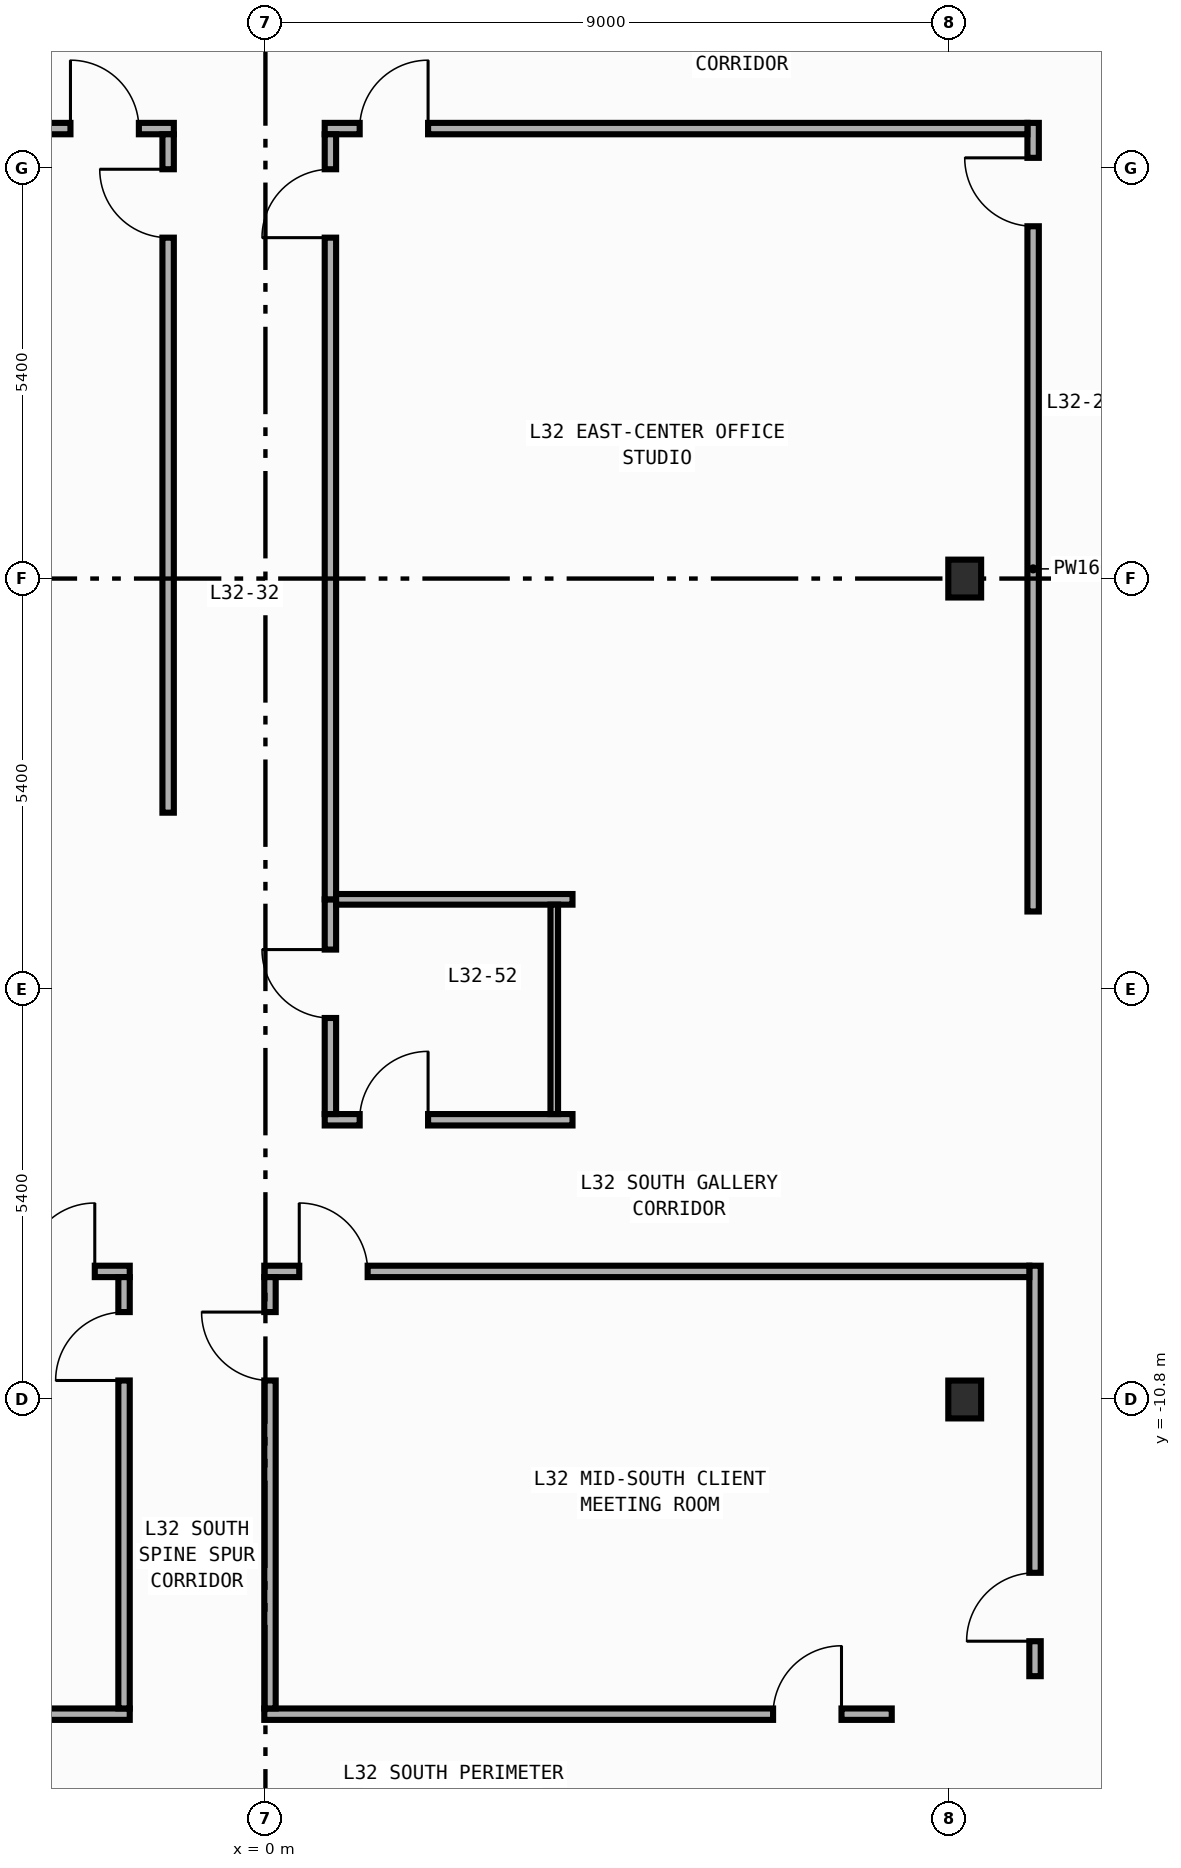
"""IFC4 building model, lengths in metres.
Left out: names, types, materials, properties, quantities, classifications, styles, units other than length and angle.
Written with IfcOpenShell. Run it as: python <this file> out.ifc"""

import sys

from ifc_helpers import new_model, si_unit, direction, frame, frame_2d, origin, origin_2d, place, context, subcontext, project, spatial, rectangle, i_section, extrude, element, fill, save


model = new_model("IFC4")
c1 = context("Model", 3, precision=1e-05, world=origin(), true_north=direction((0.0, 1.0)))
c2 = subcontext(c1, "Body", "Model", "MODEL_VIEW")
j1 = project(units=[si_unit("LENGTHUNIT", "METRE"), si_unit("PLANEANGLEUNIT", "RADIAN")], contexts=[c1])
p1 = place(None, origin())
s1 = spatial("IfcSite", under=j1, at=p1, CompositionType="ELEMENT")
p2 = place(p1, origin())
s2 = spatial("IfcBuilding", under=s1, at=p2, CompositionType="ELEMENT")
p3 = place(p2, frame((0.0, 0.0, 139.4)))
s3 = spatial("IfcBuildingStorey", under=s2, at=p3, CompositionType="ELEMENT", Elevation=139.4)
for number, where, z_axis, x_axis in (
    (1, (9.2, -10.8, 0.0), (0.0, 0.0, 1.0), (1.0, 0.0, 0.0)),
    (2, (9.2, 0.0, 0.0), (0.0, 0.0, 1.0), (1.0, 0.0, 0.0)),
):
    element("IfcColumn", number, at=place(p3, frame(where, z_axis=z_axis, x_axis=x_axis)), inside=s3, PredefinedType="COLUMN", context=c2, shape_type="SweptSolid", body=[
        extrude(i_section(OverallWidth=0.432, OverallDepth=0.498, WebThickness=0.045, FlangeThickness=0.07, FilletRadius=0.022, at=origin_2d()), origin(), (0.0, 0.0, 1.0), 4.2),
    ])
p4 = place(p3, frame((10.1, -4.38, 0.0), z_axis=(0.0, 0.0, 1.0), x_axis=(0.0, 1.0, 0.0)))
e3 = element("IfcWall", 3, at=p4, inside=s3, PredefinedType="PARTITIONING", context=c2, shape_type="SweptSolid", body=[
    extrude(rectangle(XDim=10.375, YDim=0.15, at=frame_2d((5.188, 0.0))), origin(), (0.0, 0.0, 1.0), 3.94),
])
p5 = place(p4, frame((9.015, 0.0, 0.0)))
e4 = element("IfcOpeningElement", 4, at=p5, cuts=e3, PredefinedType="OPENING", context=c2, shape_type="SweptSolid", body=[
    extrude(rectangle(XDim=0.9, YDim=2.15, at=frame_2d((0.45, 1.075))), frame((0.0, 0.085, 0.0), z_axis=(0.0, -1.0, 0.0), x_axis=(1.0, 0.0, 0.0)), (0.0, 0.0, 1.0), 0.17),
])
p6 = place(p3, frame((10.125, -14.44, 0.0), z_axis=(0.0, 0.0, 1.0), x_axis=(0.0, 1.0, 0.0)))
e5 = element("IfcWall", 5, at=p6, inside=s3, PredefinedType="PARTITIONING", context=c2, shape_type="SweptSolid", body=[
    extrude(rectangle(XDim=5.4, YDim=0.15, at=frame_2d((2.7, 0.0))), origin(), (0.0, 0.0, 1.0), 3.94),
])
p7 = place(p6, frame((0.46, 0.0, 0.0)))
e6 = element("IfcOpeningElement", 6, at=p7, cuts=e5, PredefinedType="OPENING", context=c2, shape_type="SweptSolid", body=[
    extrude(rectangle(XDim=0.9, YDim=2.15, at=frame_2d((0.45, 1.075))), frame((0.0, 0.085, 0.0), z_axis=(0.0, -1.0, 0.0), x_axis=(1.0, 0.0, 0.0)), (0.0, 0.0, 1.0), 0.17),
])
p8 = place(p3, frame((0.78, 5.92, 0.0), z_axis=(0.0, 0.0, 1.0), x_axis=(1.0, 0.0, 0.0)))
e7 = element("IfcWall", 7, at=p8, inside=s3, PredefinedType="PARTITIONING", context=c2, shape_type="SweptSolid", body=[
    extrude(rectangle(XDim=9.245, YDim=0.15, at=frame_2d((4.623, 0.0))), origin(), (0.0, 0.0, 1.0), 3.94),
])
p9 = place(p8, frame((0.46, 0.0, 0.0)))
e8 = element("IfcOpeningElement", 8, at=p9, cuts=e7, PredefinedType="OPENING", context=c2, shape_type="SweptSolid", body=[
    extrude(rectangle(XDim=0.9, YDim=2.15, at=frame_2d((0.45, 1.075))), frame((0.0, 0.085, 0.0), z_axis=(0.0, -1.0, 0.0), x_axis=(1.0, 0.0, 0.0)), (0.0, 0.0, 1.0), 0.17),
])
p10 = place(p3, frame((-10.025, 5.92, 0.0), z_axis=(0.0, 0.0, 1.0), x_axis=(1.0, 0.0, 0.0)))
e9 = element("IfcWall", 9, at=p10, inside=s3, PredefinedType="PARTITIONING", context=c2, shape_type="SweptSolid", body=[
    extrude(rectangle(XDim=8.82, YDim=0.15, at=frame_2d((4.41, 0.0))), origin(), (0.0, 0.0, 1.0), 3.94),
])
p11 = place(p10, frame((7.46, 0.0, 0.0)))
e10 = element("IfcOpeningElement", 10, at=p11, cuts=e9, PredefinedType="OPENING", context=c2, shape_type="SweptSolid", body=[
    extrude(rectangle(XDim=0.9, YDim=2.15, at=frame_2d((0.45, 1.075))), frame((0.0, 0.085, 0.0), z_axis=(0.0, -1.0, 0.0), x_axis=(1.0, 0.0, 0.0)), (0.0, 0.0, 1.0), 0.17),
])
p12 = place(p3, frame((0.78, -7.12, 0.0), z_axis=(0.0, 0.0, 1.0), x_axis=(1.0, 0.0, 0.0)))
e11 = element("IfcWall", 11, at=p12, inside=s3, PredefinedType="PARTITIONING", context=c2, shape_type="SweptSolid", body=[
    extrude(rectangle(XDim=3.26, YDim=0.15, at=frame_2d((1.63, 0.0))), origin(), (0.0, 0.0, 1.0), 3.94),
])
p13 = place(p12, frame((0.46, 0.0, 0.0)))
e12 = element("IfcOpeningElement", 12, at=p13, cuts=e11, PredefinedType="OPENING", context=c2, shape_type="SweptSolid", body=[
    extrude(rectangle(XDim=0.9, YDim=2.15, at=frame_2d((0.45, 1.075))), frame((0.0, 0.085, 0.0), z_axis=(0.0, -1.0, 0.0), x_axis=(1.0, 0.0, 0.0)), (0.0, 0.0, 1.0), 0.17),
])
p14 = place(p3, frame((-10.05, -9.115, 0.0), z_axis=(0.0, 0.0, 1.0), x_axis=(1.0, 0.0, 0.0)))
e13 = element("IfcWall", 13, at=p14, inside=s3, PredefinedType="PARTITIONING", context=c2, shape_type="SweptSolid", body=[
    extrude(rectangle(XDim=8.265, YDim=0.15, at=frame_2d((4.133, 0.0))), origin(), (0.0, 0.0, 1.0), 3.94),
])
p15 = place(p14, frame((6.905, 0.0, 0.0)))
e14 = element("IfcOpeningElement", 14, at=p15, cuts=e13, PredefinedType="OPENING", context=c2, shape_type="SweptSolid", body=[
    extrude(rectangle(XDim=0.9, YDim=2.15, at=frame_2d((0.45, 1.075))), frame((0.0, 0.085, 0.0), z_axis=(0.0, -1.0, 0.0), x_axis=(1.0, 0.0, 0.0)), (0.0, 0.0, 1.0), 0.17),
])
p16 = place(p3, frame((-0.015, -9.115, 0.0), z_axis=(0.0, 0.0, 1.0), x_axis=(1.0, 0.0, 0.0)))
e15 = element("IfcWall", 15, at=p16, inside=s3, PredefinedType="PARTITIONING", context=c2, shape_type="SweptSolid", body=[
    extrude(rectangle(XDim=10.065, YDim=0.15, at=frame_2d((5.032, 0.0))), origin(), (0.0, 0.0, 1.0), 3.94),
])
p17 = place(p16, frame((0.46, 0.0, 0.0)))
e16 = element("IfcOpeningElement", 16, at=p17, cuts=e15, PredefinedType="OPENING", context=c2, shape_type="SweptSolid", body=[
    extrude(rectangle(XDim=0.9, YDim=2.15, at=frame_2d((0.45, 1.075))), frame((0.0, 0.085, 0.0), z_axis=(0.0, -1.0, 0.0), x_axis=(1.0, 0.0, 0.0)), (0.0, 0.0, 1.0), 0.17),
])
p18 = place(p3, frame((0.855, -7.045, 0.0), z_axis=(0.0, 0.0, 1.0), x_axis=(0.0, 1.0, 0.0)))
e17 = element("IfcWall", 17, at=p18, inside=s3, PredefinedType="PARTITIONING", context=c2, shape_type="SweptSolid", body=[
    extrude(rectangle(XDim=2.825, YDim=0.15, at=frame_2d((1.413, 0.0))), origin(), (0.0, 0.0, 1.0), 3.94),
])
p19 = place(p18, frame((1.264, 0.0, 0.0)))
e18 = element("IfcOpeningElement", 18, at=p19, cuts=e17, PredefinedType="OPENING", context=c2, shape_type="SweptSolid", body=[
    extrude(rectangle(XDim=0.9, YDim=2.15, at=frame_2d((0.45, 1.075))), frame((0.0, 0.085, 0.0), z_axis=(0.0, -1.0, 0.0), x_axis=(1.0, 0.0, 0.0)), (0.0, 0.0, 1.0), 0.17),
])
p20 = place(p3, frame((0.855, -4.22, 0.0), z_axis=(0.0, 0.0, 1.0), x_axis=(0.0, 1.0, 0.0)))
e19 = element("IfcWall", 19, at=p20, inside=s3, PredefinedType="PARTITIONING", context=c2, shape_type="SweptSolid", body=[
    extrude(rectangle(XDim=10.065, YDim=0.15, at=frame_2d((5.032, 0.0))), origin(), (0.0, 0.0, 1.0), 3.94),
])
p21 = place(p20, frame((8.705, 0.0, 0.0)))
e20 = element("IfcOpeningElement", 20, at=p21, cuts=e19, PredefinedType="OPENING", context=c2, shape_type="SweptSolid", body=[
    extrude(rectangle(XDim=0.9, YDim=2.15, at=frame_2d((0.45, 1.075))), frame((0.0, 0.085, 0.0), z_axis=(0.0, -1.0, 0.0), x_axis=(1.0, 0.0, 0.0)), (0.0, 0.0, 1.0), 0.17),
])
p22 = place(p3, frame((-1.28, -3.08, 0.0), z_axis=(0.0, 0.0, 1.0), x_axis=(0.0, 1.0, 0.0)))
e21 = element("IfcWall", 21, at=p22, inside=s3, PredefinedType="PARTITIONING", context=c2, shape_type="SweptSolid", body=[
    extrude(rectangle(XDim=8.925, YDim=0.15, at=frame_2d((4.462, 0.0))), origin(), (0.0, 0.0, 1.0), 3.94),
])
p23 = place(p22, frame((7.565, 0.0, 0.0)))
e22 = element("IfcOpeningElement", 22, at=p23, cuts=e21, PredefinedType="OPENING", context=c2, shape_type="SweptSolid", body=[
    extrude(rectangle(XDim=0.9, YDim=2.15, at=frame_2d((0.45, 1.075))), frame((0.0, 0.085, 0.0), z_axis=(0.0, -1.0, 0.0), x_axis=(1.0, 0.0, 0.0)), (0.0, 0.0, 1.0), 0.17),
])
p24 = place(p3, frame((-8.24, -14.94, 0.0), z_axis=(0.0, 0.0, 1.0), x_axis=(1.0, 0.0, 0.0)))
e23 = element("IfcWall", 23, at=p24, inside=s3, PredefinedType="PARTITIONING", context=c2, shape_type="SweptSolid", body=[
    extrude(rectangle(XDim=6.455, YDim=0.15, at=frame_2d((3.228, 0.0))), origin(), (0.0, 0.0, 1.0), 3.94),
])
p25 = place(p24, frame((0.662, 0.0, 0.0)))
e24 = element("IfcOpeningElement", 24, at=p25, cuts=e23, PredefinedType="OPENING", context=c2, shape_type="SweptSolid", body=[
    extrude(rectangle(XDim=0.9, YDim=2.15, at=frame_2d((0.45, 1.075))), frame((0.0, 0.085, 0.0), z_axis=(0.0, -1.0, 0.0), x_axis=(1.0, 0.0, 0.0)), (0.0, 0.0, 1.0), 0.17),
])
p26 = place(p3, frame((-0.015, -14.94, 0.0), z_axis=(0.0, 0.0, 1.0), x_axis=(1.0, 0.0, 0.0)))
e25 = element("IfcWall", 25, at=p26, inside=s3, PredefinedType="PARTITIONING", context=c2, shape_type="SweptSolid", body=[
    extrude(rectangle(XDim=8.255, YDim=0.15, at=frame_2d((4.127, 0.0))), origin(), (0.0, 0.0, 1.0), 3.94),
])
p27 = place(p26, frame((6.694, 0.0, 0.0)))
e26 = element("IfcOpeningElement", 26, at=p27, cuts=e25, PredefinedType="OPENING", context=c2, shape_type="SweptSolid", body=[
    extrude(rectangle(XDim=0.9, YDim=2.15, at=frame_2d((0.45, 1.075))), frame((0.0, 0.085, 0.0), z_axis=(0.0, -1.0, 0.0), x_axis=(1.0, 0.0, 0.0)), (0.0, 0.0, 1.0), 0.17),
])
p28 = place(p3, frame((-1.86, -14.865, 0.0), z_axis=(0.0, 0.0, 1.0), x_axis=(0.0, 1.0, 0.0)))
e27 = element("IfcWall", 27, at=p28, inside=s3, PredefinedType="PARTITIONING", context=c2, shape_type="SweptSolid", body=[
    extrude(rectangle(XDim=5.675, YDim=0.15, at=frame_2d((2.837, 0.0))), origin(), (0.0, 0.0, 1.0), 3.94),
])
p29 = place(p28, frame((4.315, 0.0, 0.0)))
e28 = element("IfcOpeningElement", 28, at=p29, cuts=e27, PredefinedType="OPENING", context=c2, shape_type="SweptSolid", body=[
    extrude(rectangle(XDim=0.9, YDim=2.15, at=frame_2d((0.45, 1.075))), frame((0.0, 0.085, 0.0), z_axis=(0.0, -1.0, 0.0), x_axis=(1.0, 0.0, 0.0)), (0.0, 0.0, 1.0), 0.17),
])
p30 = place(p3, frame((0.06, -14.865, 0.0), z_axis=(0.0, 0.0, 1.0), x_axis=(0.0, 1.0, 0.0)))
e29 = element("IfcWall", 29, at=p30, inside=s3, PredefinedType="PARTITIONING", context=c2, shape_type="SweptSolid", body=[
    extrude(rectangle(XDim=5.675, YDim=0.15, at=frame_2d((2.837, 0.0))), origin(), (0.0, 0.0, 1.0), 3.94),
])
p31 = place(p30, frame((4.315, 0.0, 0.0)))
e30 = element("IfcOpeningElement", 30, at=p31, cuts=e29, PredefinedType="OPENING", context=c2, shape_type="SweptSolid", body=[
    extrude(rectangle(XDim=0.9, YDim=2.15, at=frame_2d((0.45, 1.075))), frame((0.0, 0.085, 0.0), z_axis=(0.0, -1.0, 0.0), x_axis=(1.0, 0.0, 0.0)), (0.0, 0.0, 1.0), 0.17),
])
p32 = place(p3, frame((0.93, -4.22, 0.0), z_axis=(0.0, 0.0, 1.0), x_axis=(1.0, 0.0, 0.0)))
e31 = element("IfcWall", 31, at=p32, inside=s3, PredefinedType="PARTITIONING", context=c2, shape_type="SweptSolid", body=[
    extrude(rectangle(XDim=3.11, YDim=0.14, at=frame_2d((1.555, 0.0))), origin(), (0.0, 0.0, 1.0), 3.94),
])
p33 = place(p3, frame((3.8, -4.29, 0.0), z_axis=(0.0, 0.0, 1.0), x_axis=(0.0, -1.0, 0.0)))
e32 = element("IfcWall", 32, at=p33, inside=s3, PredefinedType="PARTITIONING", context=c2, shape_type="SweptSolid", body=[
    extrude(rectangle(XDim=2.755, YDim=0.1, at=frame_2d((1.377, 0.0))), origin(), (0.0, 0.0, 1.0), 3.94),
])
p34 = place(p5, origin())
e33 = element("IfcDoor", 33, at=p34, inside=s3, OperationType="SINGLE_SWING_RIGHT", PredefinedType="DOOR", context=c2, shape_type="SweptSolid", body=[
    extrude(rectangle(XDim=0.9, YDim=2.15, at=frame_2d((0.45, 1.075))), frame((0.0, 0.025, 0.0), z_axis=(0.0, -1.0, 0.0), x_axis=(1.0, 0.0, 0.0)), (0.0, 0.0, 1.0), 0.05),
])
fill(e4, e33)
p35 = place(p7, origin())
e34 = element("IfcDoor", 34, at=p35, inside=s3, OperationType="SINGLE_SWING_LEFT", PredefinedType="DOOR", context=c2, shape_type="SweptSolid", body=[
    extrude(rectangle(XDim=0.9, YDim=2.15, at=frame_2d((0.45, 1.075))), frame((0.0, 0.025, 0.0), z_axis=(0.0, -1.0, 0.0), x_axis=(1.0, 0.0, 0.0)), (0.0, 0.0, 1.0), 0.05),
])
fill(e6, e34)
p36 = place(p9, origin())
e35 = element("IfcDoor", 35, at=p36, inside=s3, OperationType="SINGLE_SWING_RIGHT", PredefinedType="DOOR", context=c2, shape_type="SweptSolid", body=[
    extrude(rectangle(XDim=0.9, YDim=2.15, at=frame_2d((0.45, 1.075))), frame((0.0, 0.025, 0.0), z_axis=(0.0, -1.0, 0.0), x_axis=(1.0, 0.0, 0.0)), (0.0, 0.0, 1.0), 0.05),
])
fill(e8, e35)
p37 = place(p11, origin())
e36 = element("IfcDoor", 36, at=p37, inside=s3, OperationType="SINGLE_SWING_LEFT", PredefinedType="DOOR", context=c2, shape_type="SweptSolid", body=[
    extrude(rectangle(XDim=0.9, YDim=2.15, at=frame_2d((0.45, 1.075))), frame((0.0, 0.025, 0.0), z_axis=(0.0, -1.0, 0.0), x_axis=(1.0, 0.0, 0.0)), (0.0, 0.0, 1.0), 0.05),
])
fill(e10, e36)
p38 = place(p13, origin())
e37 = element("IfcDoor", 37, at=p38, inside=s3, OperationType="SINGLE_SWING_RIGHT", PredefinedType="DOOR", context=c2, shape_type="SweptSolid", body=[
    extrude(rectangle(XDim=0.9, YDim=2.15, at=frame_2d((0.45, 1.075))), frame((0.0, 0.025, 0.0), z_axis=(0.0, -1.0, 0.0), x_axis=(1.0, 0.0, 0.0)), (0.0, 0.0, 1.0), 0.05),
])
fill(e12, e37)
p39 = place(p15, origin())
e38 = element("IfcDoor", 38, at=p39, inside=s3, OperationType="SINGLE_SWING_RIGHT", PredefinedType="DOOR", context=c2, shape_type="SweptSolid", body=[
    extrude(rectangle(XDim=0.9, YDim=2.15, at=frame_2d((0.45, 1.075))), frame((0.0, 0.025, 0.0), z_axis=(0.0, -1.0, 0.0), x_axis=(1.0, 0.0, 0.0)), (0.0, 0.0, 1.0), 0.05),
])
fill(e14, e38)
p40 = place(p17, origin())
e39 = element("IfcDoor", 39, at=p40, inside=s3, OperationType="SINGLE_SWING_LEFT", PredefinedType="DOOR", context=c2, shape_type="SweptSolid", body=[
    extrude(rectangle(XDim=0.9, YDim=2.15, at=frame_2d((0.45, 1.075))), frame((0.0, 0.025, 0.0), z_axis=(0.0, -1.0, 0.0), x_axis=(1.0, 0.0, 0.0)), (0.0, 0.0, 1.0), 0.05),
])
fill(e16, e39)
p41 = place(p19, origin())
e40 = element("IfcDoor", 40, at=p41, inside=s3, OperationType="SINGLE_SWING_RIGHT", PredefinedType="DOOR", context=c2, shape_type="SweptSolid", body=[
    extrude(rectangle(XDim=0.9, YDim=2.15, at=frame_2d((0.45, 1.075))), frame((0.0, 0.025, 0.0), z_axis=(0.0, -1.0, 0.0), x_axis=(1.0, 0.0, 0.0)), (0.0, 0.0, 1.0), 0.05),
])
fill(e18, e40)
p42 = place(p21, origin())
e41 = element("IfcDoor", 41, at=p42, inside=s3, OperationType="SINGLE_SWING_LEFT", PredefinedType="DOOR", context=c2, shape_type="SweptSolid", body=[
    extrude(rectangle(XDim=0.9, YDim=2.15, at=frame_2d((0.45, 1.075))), frame((0.0, 0.025, 0.0), z_axis=(0.0, -1.0, 0.0), x_axis=(1.0, 0.0, 0.0)), (0.0, 0.0, 1.0), 0.05),
])
fill(e20, e41)
p43 = place(p23, origin())
e42 = element("IfcDoor", 42, at=p43, inside=s3, OperationType="SINGLE_SWING_RIGHT", PredefinedType="DOOR", context=c2, shape_type="SweptSolid", body=[
    extrude(rectangle(XDim=0.9, YDim=2.15, at=frame_2d((0.45, 1.075))), frame((0.0, 0.025, 0.0), z_axis=(0.0, -1.0, 0.0), x_axis=(1.0, 0.0, 0.0)), (0.0, 0.0, 1.0), 0.05),
])
fill(e22, e42)
p44 = place(p27, origin())
e43 = element("IfcDoor", 43, at=p44, inside=s3, OperationType="SINGLE_SWING_RIGHT", PredefinedType="DOOR", context=c2, shape_type="SweptSolid", body=[
    extrude(rectangle(XDim=0.9, YDim=2.15, at=frame_2d((0.45, 1.075))), frame((0.0, 0.025, 0.0), z_axis=(0.0, -1.0, 0.0), x_axis=(1.0, 0.0, 0.0)), (0.0, 0.0, 1.0), 0.05),
])
fill(e26, e43)
p45 = place(p29, origin())
e44 = element("IfcDoor", 44, at=p45, inside=s3, OperationType="SINGLE_SWING_LEFT", PredefinedType="DOOR", context=c2, shape_type="SweptSolid", body=[
    extrude(rectangle(XDim=0.9, YDim=2.15, at=frame_2d((0.45, 1.075))), frame((0.0, 0.025, 0.0), z_axis=(0.0, -1.0, 0.0), x_axis=(1.0, 0.0, 0.0)), (0.0, 0.0, 1.0), 0.05),
])
fill(e28, e44)
p46 = place(p31, origin())
e45 = element("IfcDoor", 45, at=p46, inside=s3, OperationType="SINGLE_SWING_RIGHT", PredefinedType="DOOR", context=c2, shape_type="SweptSolid", body=[
    extrude(rectangle(XDim=0.9, YDim=2.15, at=frame_2d((0.45, 1.075))), frame((0.0, 0.025, 0.0), z_axis=(0.0, -1.0, 0.0), x_axis=(1.0, 0.0, 0.0)), (0.0, 0.0, 1.0), 0.05),
])
fill(e30, e45)
save(model, sys.argv[1])
